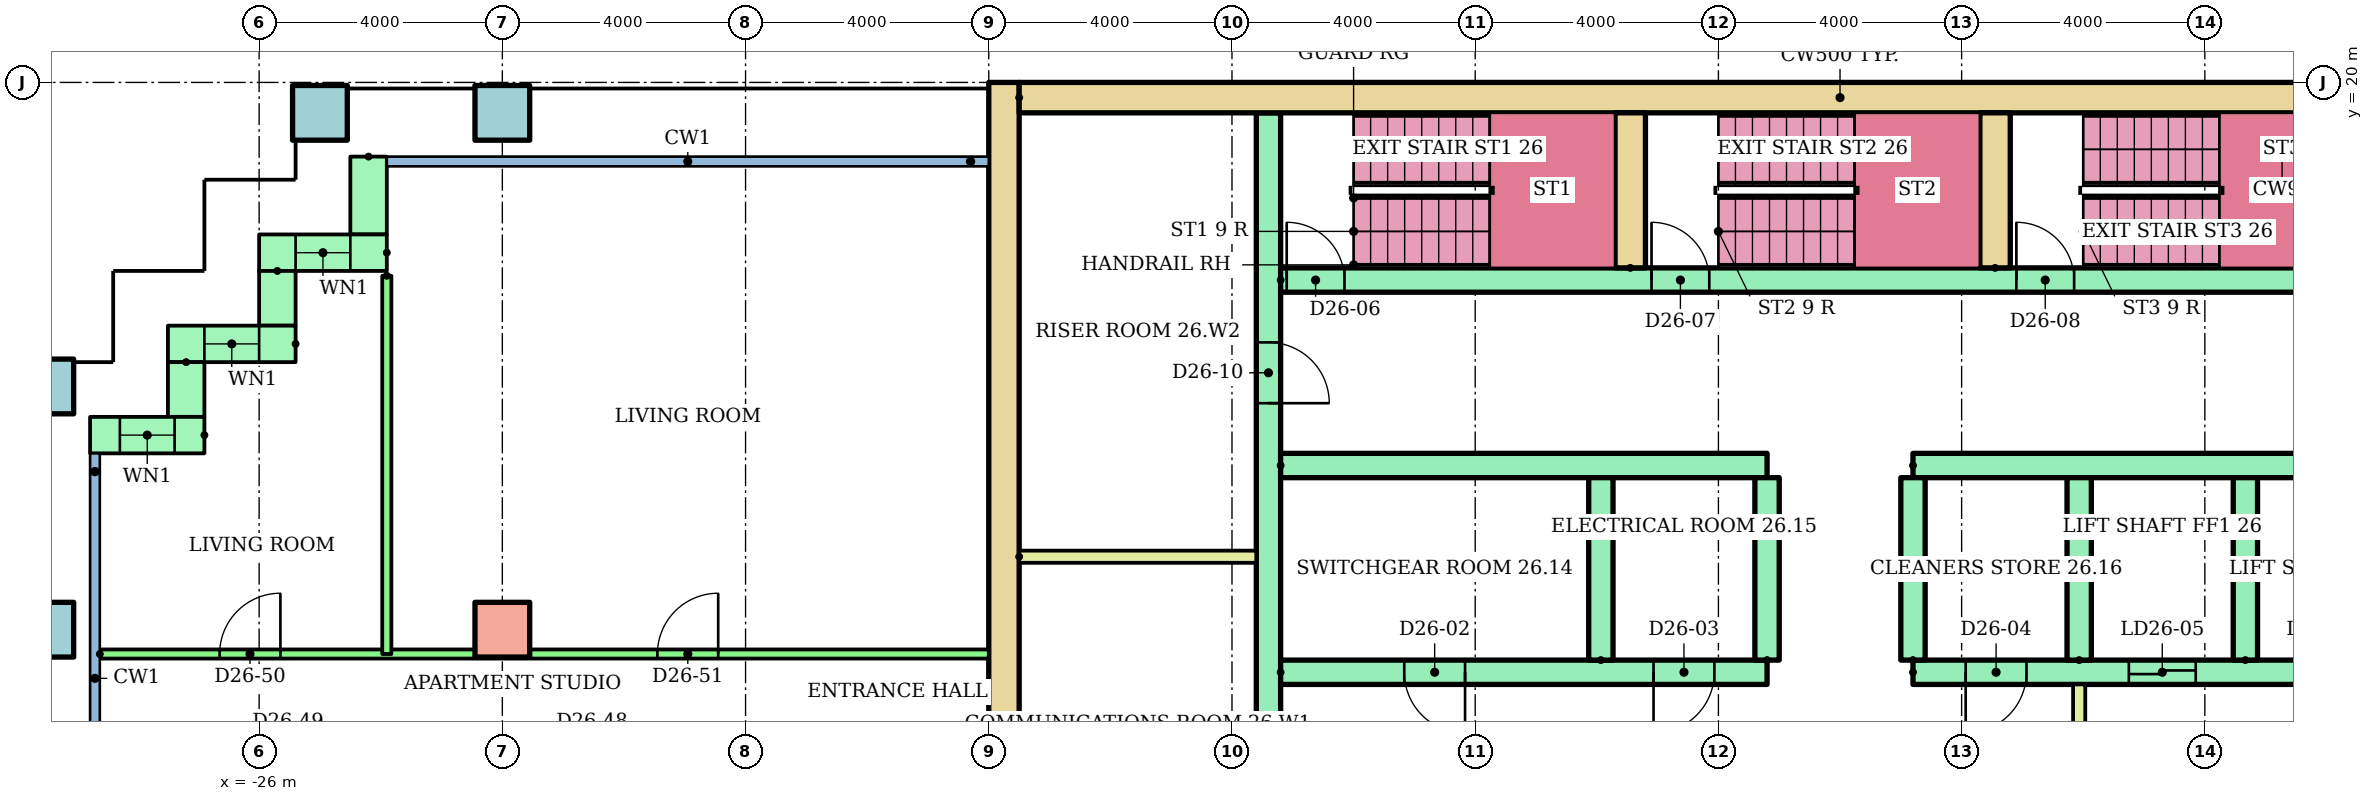
"""IFC4 building model, lengths in metres.
Left out: names, types, materials, properties, quantities, classifications, styles, units other than length and angle.
Written with IfcOpenShell. Run it as: python <this file> out.ifc"""

import sys

from ifc_helpers import new_model, si_unit, direction, frame, frame_2d, origin, origin_2d, place, context, subcontext, project, spatial, rectangle, hollow_rectangle, extrude, element, fill, save


model = new_model("IFC4")
c1 = context("Model", 3, precision=1e-05, world=origin(), true_north=direction((0.0, 1.0)))
c2 = subcontext(c1, "Body", "Model", "MODEL_VIEW")
j1 = project(units=[si_unit("LENGTHUNIT", "METRE"), si_unit("PLANEANGLEUNIT", "RADIAN")], contexts=[c1])
p1 = place(None, origin())
s1 = spatial("IfcSite", under=j1, at=p1, CompositionType="ELEMENT")
p2 = place(p1, origin())
s2 = spatial("IfcBuilding", under=s1, at=p2, CompositionType="ELEMENT")
p3 = place(p2, frame((0.0, 0.0, 99.9)))
s3 = spatial("IfcBuildingStorey", under=s2, at=p3, CompositionType="ELEMENT", Elevation=99.9)
p4 = place(p3, frame((-29.5, 11.0, 0.0)))
e1 = element("IfcColumn", 1, at=p4, inside=s3, PredefinedType="COLUMN", context=c2, shape_type="SweptSolid", body=[
    extrude(hollow_rectangle(XDim=0.9, YDim=0.9, WallThickness=0.045, at=origin_2d()), origin(), (0.0, 0.0, 1.0), 3.2),
])
p5 = place(p3, frame((-22.0, 11.0, 0.0)))
e2 = element("IfcColumn", 2, at=p5, inside=s3, PredefinedType="COLUMN", context=c2, shape_type="SweptSolid", body=[
    extrude(rectangle(XDim=0.9, YDim=0.9, at=origin_2d()), origin(), (0.0, 0.0, 1.0), 3.2),
])
for number, where in (
    (3, (-29.5, 15.0, 0.0)),
    (4, (-25.0, 19.5, 0.0)),
    (5, (-22.0, 19.5, 0.0)),
):
    element("IfcColumn", number, at=place(p3, frame(where)), inside=s3, PredefinedType="COLUMN", context=c2, shape_type="SweptSolid", body=[
        extrude(hollow_rectangle(XDim=0.9, YDim=0.9, WallThickness=0.045, at=origin_2d()), origin(), (0.0, 0.0, 1.0), 3.2),
    ])
p6 = place(p3, frame((-24.2, 18.78, 0.0), z_axis=(0.0, 0.0, 1.0), x_axis=(0.0, -1.0, 0.0)))
e6 = element("IfcWall", 6, at=p6, inside=s3, PredefinedType="STANDARD", context=c2, shape_type="SweptSolid", body=[
    extrude(rectangle(XDim=1.28, YDim=0.6, at=frame_2d((0.64, 0.0))), origin(), (0.0, 0.0, 1.0), 2.92),
])
p7 = place(p3, frame((-23.9, 17.2, 0.0), z_axis=(0.0, 0.0, 1.0), x_axis=(-1.0, 0.0, 0.0)))
e7 = element("IfcWall", 7, at=p7, inside=s3, PredefinedType="STANDARD", context=c2, shape_type="SweptSolid", body=[
    extrude(rectangle(XDim=2.1, YDim=0.6, at=frame_2d((1.05, 0.0))), origin(), (0.0, 0.0, 1.0), 2.92),
])
p8 = place(p7, frame((0.6, 0.0, 0.9)))
e8 = element("IfcOpeningElement", 8, at=p8, cuts=e7, PredefinedType="OPENING", context=c2, shape_type="SweptSolid", body=[
    extrude(rectangle(XDim=0.9, YDim=1.5, at=frame_2d((0.45, 0.75))), frame((0.0, 0.31, 0.0), z_axis=(0.0, -1.0, 0.0), x_axis=(1.0, 0.0, 0.0)), (0.0, 0.0, 1.0), 0.62),
])
p9 = place(p3, frame((-25.7, 16.9, 0.0), z_axis=(0.0, 0.0, 1.0), x_axis=(0.0, -1.0, 0.0)))
e9 = element("IfcWall", 9, at=p9, inside=s3, PredefinedType="STANDARD", context=c2, shape_type="SweptSolid", body=[
    extrude(rectangle(XDim=0.9, YDim=0.6, at=frame_2d((0.45, 0.0))), origin(), (0.0, 0.0, 1.0), 2.92),
])
p10 = place(p3, frame((-25.4, 15.7, 0.0), z_axis=(0.0, 0.0, 1.0), x_axis=(-1.0, 0.0, 0.0)))
e10 = element("IfcWall", 10, at=p10, inside=s3, PredefinedType="STANDARD", context=c2, shape_type="SweptSolid", body=[
    extrude(rectangle(XDim=2.1, YDim=0.6, at=frame_2d((1.05, 0.0))), origin(), (0.0, 0.0, 1.0), 2.92),
])
p11 = place(p10, frame((0.6, 0.0, 0.9)))
e11 = element("IfcOpeningElement", 11, at=p11, cuts=e10, PredefinedType="OPENING", context=c2, shape_type="SweptSolid", body=[
    extrude(rectangle(XDim=0.9, YDim=1.5, at=frame_2d((0.45, 0.75))), frame((0.0, 0.31, 0.0), z_axis=(0.0, -1.0, 0.0), x_axis=(1.0, 0.0, 0.0)), (0.0, 0.0, 1.0), 0.62),
])
p12 = place(p3, frame((-27.2, 15.4, 0.0), z_axis=(0.0, 0.0, 1.0), x_axis=(0.0, -1.0, 0.0)))
e12 = element("IfcWall", 12, at=p12, inside=s3, PredefinedType="STANDARD", context=c2, shape_type="SweptSolid", body=[
    extrude(rectangle(XDim=0.9, YDim=0.6, at=frame_2d((0.45, 0.0))), origin(), (0.0, 0.0, 1.0), 2.92),
])
p13 = place(p3, frame((-26.9, 14.2, 0.0), z_axis=(0.0, 0.0, 1.0), x_axis=(-1.0, 0.0, 0.0)))
e13 = element("IfcWall", 13, at=p13, inside=s3, PredefinedType="STANDARD", context=c2, shape_type="SweptSolid", body=[
    extrude(rectangle(XDim=1.88, YDim=0.6, at=frame_2d((0.94, 0.0))), origin(), (0.0, 0.0, 1.0), 2.92),
])
p14 = place(p13, frame((0.49, 0.0, 0.9)))
e14 = element("IfcOpeningElement", 14, at=p14, cuts=e13, PredefinedType="OPENING", context=c2, shape_type="SweptSolid", body=[
    extrude(rectangle(XDim=0.9, YDim=1.5, at=frame_2d((0.45, 0.75))), frame((0.0, 0.31, 0.0), z_axis=(0.0, -1.0, 0.0), x_axis=(1.0, 0.0, 0.0)), (0.0, 0.0, 1.0), 0.62),
])
p15 = place(p3, frame((-13.75, 3.0, 0.0), z_axis=(0.0, 0.0, 1.0), x_axis=(0.0, 1.0, 0.0)))
e15 = element("IfcWall", 15, at=p15, inside=s3, PredefinedType="SHEAR", context=c2, shape_type="SweptSolid", body=[
    extrude(rectangle(XDim=17.0, YDim=0.5, at=frame_2d((8.5, 0.0))), origin(), (0.0, 0.0, 1.0), 2.92),
])
p16 = place(p3, frame((-13.5, 19.75, 0.0)))
e16 = element("IfcWall", 16, at=p16, inside=s3, PredefinedType="SHEAR", context=c2, shape_type="SweptSolid", body=[
    extrude(rectangle(XDim=27.0, YDim=0.5, at=frame_2d((13.5, 0.0))), origin(), (0.0, 0.0, 1.0), 2.92),
])
p17 = place(p3, frame((-9.4, 6.8, 0.0), z_axis=(0.0, 0.0, 1.0), x_axis=(0.0, 1.0, 0.0)))
e17 = element("IfcWall", 17, at=p17, inside=s3, PredefinedType="SHEAR", context=c2, shape_type="SweptSolid", body=[
    extrude(rectangle(XDim=12.7, YDim=0.4, at=frame_2d((6.35, 0.0))), origin(), (0.0, 0.0, 1.0), 2.92),
])
p18 = place(p17, frame((1.15, 0.0, 0.0)))
e18 = element("IfcOpeningElement", 18, at=p18, cuts=e17, PredefinedType="OPENING", context=c2, shape_type="SweptSolid", body=[
    extrude(rectangle(XDim=1.0, YDim=2.1, at=frame_2d((0.5, 1.05))), frame((0.0, 0.21, 0.0), z_axis=(0.0, -1.0, 0.0), x_axis=(1.0, 0.0, 0.0)), (0.0, 0.0, 1.0), 0.42),
])
p19 = place(p17, frame((7.925, 0.0, 0.0)))
e19 = element("IfcOpeningElement", 19, at=p19, cuts=e17, PredefinedType="OPENING", context=c2, shape_type="SweptSolid", body=[
    extrude(rectangle(XDim=1.0, YDim=2.1, at=frame_2d((0.5, 1.05))), frame((0.0, 0.21, 0.0), z_axis=(0.0, -1.0, 0.0), x_axis=(1.0, 0.0, 0.0)), (0.0, 0.0, 1.0), 0.42),
])
p20 = place(p3, frame((-9.2, 10.3, 0.0)))
e20 = element("IfcWall", 20, at=p20, inside=s3, PredefinedType="SHEAR", context=c2, shape_type="SweptSolid", body=[
    extrude(rectangle(XDim=8.0, YDim=0.4, at=frame_2d((4.0, 0.0))), origin(), (0.0, 0.0, 1.0), 2.92),
])
p21 = place(p20, frame((2.033, 0.0, 0.0)))
e21 = element("IfcOpeningElement", 21, at=p21, cuts=e20, PredefinedType="OPENING", context=c2, shape_type="SweptSolid", body=[
    extrude(rectangle(XDim=1.0, YDim=2.1, at=frame_2d((0.5, 1.05))), frame((0.0, 0.21, 0.0), z_axis=(0.0, -1.0, 0.0), x_axis=(1.0, 0.0, 0.0)), (0.0, 0.0, 1.0), 0.42),
])
p22 = place(p20, frame((6.133, 0.0, 0.0)))
e22 = element("IfcOpeningElement", 22, at=p22, cuts=e20, PredefinedType="OPENING", context=c2, shape_type="SweptSolid", body=[
    extrude(rectangle(XDim=1.0, YDim=2.1, at=frame_2d((0.5, 1.05))), frame((0.0, 0.21, 0.0), z_axis=(0.0, -1.0, 0.0), x_axis=(1.0, 0.0, 0.0)), (0.0, 0.0, 1.0), 0.42),
])
p23 = place(p3, frame((-9.2, 13.7, 0.0)))
e23 = element("IfcWall", 23, at=p23, inside=s3, PredefinedType="SHEAR", context=c2, shape_type="SweptSolid", body=[
    extrude(rectangle(XDim=8.0, YDim=0.4, at=frame_2d((4.0, 0.0))), origin(), (0.0, 0.0, 1.0), 2.92),
])
p24 = place(p3, frame((1.2, 10.3, 0.0)))
e24 = element("IfcWall", 24, at=p24, inside=s3, PredefinedType="SHEAR", context=c2, shape_type="SweptSolid", body=[
    extrude(rectangle(XDim=8.0, YDim=0.4, at=frame_2d((4.0, 0.0))), origin(), (0.0, 0.0, 1.0), 2.92),
])
p25 = place(p24, frame((3.55, 0.0, 0.0)))
e25 = element("IfcOpeningElement", 25, at=p25, cuts=e24, PredefinedType="OPENING", context=c2, shape_type="SweptSolid", body=[
    extrude(rectangle(XDim=1.1, YDim=2.1, at=frame_2d((0.55, 1.05))), frame((0.0, 0.21, 0.0), z_axis=(0.0, -1.0, 0.0), x_axis=(1.0, 0.0, 0.0)), (0.0, 0.0, 1.0), 0.42),
])
p26 = place(p24, frame((6.283, 0.0, 0.0)))
e26 = element("IfcOpeningElement", 26, at=p26, cuts=e24, PredefinedType="OPENING", context=c2, shape_type="SweptSolid", body=[
    extrude(rectangle(XDim=1.1, YDim=2.1, at=frame_2d((0.55, 1.05))), frame((0.0, 0.21, 0.0), z_axis=(0.0, -1.0, 0.0), x_axis=(1.0, 0.0, 0.0)), (0.0, 0.0, 1.0), 0.42),
])
p27 = place(p24, frame((0.867, 0.0, 0.0)))
e27 = element("IfcOpeningElement", 27, at=p27, cuts=e24, PredefinedType="OPENING", context=c2, shape_type="SweptSolid", body=[
    extrude(rectangle(XDim=1.0, YDim=2.1, at=frame_2d((0.5, 1.05))), frame((0.0, 0.21, 0.0), z_axis=(0.0, -1.0, 0.0), x_axis=(1.0, 0.0, 0.0)), (0.0, 0.0, 1.0), 0.42),
])
p28 = place(p3, frame((1.2, 13.7, 0.0)))
e28 = element("IfcWall", 28, at=p28, inside=s3, PredefinedType="SHEAR", context=c2, shape_type="SweptSolid", body=[
    extrude(rectangle(XDim=8.0, YDim=0.4, at=frame_2d((4.0, 0.0))), origin(), (0.0, 0.0, 1.0), 2.92),
])
for number, where, z_axis, x_axis in (
    (29, (-3.933, 10.5, 0.0), (0.0, 0.0, 1.0), (0.0, 1.0, 0.0)),
    (30, (-1.2, 10.5, 0.0), (0.0, 0.0, 1.0), (0.0, 1.0, 0.0)),
    (31, (1.2, 10.5, 0.0), (0.0, 0.0, 1.0), (0.0, 1.0, 0.0)),
    (32, (3.933, 10.5, 0.0), (0.0, 0.0, 1.0), (0.0, 1.0, 0.0)),
    (33, (6.667, 10.5, 0.0), (0.0, 0.0, 1.0), (0.0, 1.0, 0.0)),
):
    element("IfcWall", number, at=place(p3, frame(where, z_axis=z_axis, x_axis=x_axis)), inside=s3, PredefinedType="SHEAR", context=c2, shape_type="SweptSolid", body=[
        extrude(rectangle(XDim=3.0, YDim=0.4, at=frame_2d((1.5, 0.0))), origin(), (0.0, 0.0, 1.0), 2.92),
    ])
p29 = place(p3, frame((3.933, 6.8, 0.0), z_axis=(0.0, 0.0, 1.0), x_axis=(0.0, 1.0, 0.0)))
e34 = element("IfcWall", 34, at=p29, inside=s3, PredefinedType="PARTITIONING", context=c2, shape_type="SweptSolid", body=[
    extrude(rectangle(XDim=3.3, YDim=0.2, at=frame_2d((1.65, 0.0))), origin(), (0.0, 0.0, 1.0), 2.92),
])
p30 = place(p29, frame((1.1, 0.0, 0.0)))
e35 = element("IfcOpeningElement", 35, at=p30, cuts=e34, PredefinedType="OPENING", context=c2, shape_type="SweptSolid", body=[
    extrude(rectangle(XDim=1.1, YDim=2.1, at=frame_2d((0.55, 1.05))), frame((0.0, 0.11, 0.0), z_axis=(0.0, -1.0, 0.0), x_axis=(1.0, 0.0, 0.0)), (0.0, 0.0, 1.0), 0.22),
])
p31 = place(p3, frame((-9.2, 16.75, 0.0)))
e36 = element("IfcWall", 36, at=p31, inside=s3, PredefinedType="SHEAR", context=c2, shape_type="SweptSolid", body=[
    extrude(rectangle(XDim=18.4, YDim=0.4, at=frame_2d((9.2, 0.0))), origin(), (0.0, 0.0, 1.0), 2.92),
])
p32 = place(p31, frame((0.1, 0.0, 0.0)))
e37 = element("IfcOpeningElement", 37, at=p32, cuts=e36, PredefinedType="OPENING", context=c2, shape_type="SweptSolid", body=[
    extrude(rectangle(XDim=0.95, YDim=2.1, at=frame_2d((0.475, 1.05))), frame((0.0, 0.21, 0.0), z_axis=(0.0, -1.0, 0.0), x_axis=(1.0, 0.0, 0.0)), (0.0, 0.0, 1.0), 0.42),
])
p33 = place(p31, frame((6.1, 0.0, 0.0)))
e38 = element("IfcOpeningElement", 38, at=p33, cuts=e36, PredefinedType="OPENING", context=c2, shape_type="SweptSolid", body=[
    extrude(rectangle(XDim=0.95, YDim=2.1, at=frame_2d((0.475, 1.05))), frame((0.0, 0.21, 0.0), z_axis=(0.0, -1.0, 0.0), x_axis=(1.0, 0.0, 0.0)), (0.0, 0.0, 1.0), 0.42),
])
p34 = place(p31, frame((12.1, 0.0, 0.0)))
e39 = element("IfcOpeningElement", 39, at=p34, cuts=e36, PredefinedType="OPENING", context=c2, shape_type="SweptSolid", body=[
    extrude(rectangle(XDim=0.95, YDim=2.1, at=frame_2d((0.475, 1.05))), frame((0.0, 0.21, 0.0), z_axis=(0.0, -1.0, 0.0), x_axis=(1.0, 0.0, 0.0)), (0.0, 0.0, 1.0), 0.42),
])
for number, where, z_axis, x_axis in (
    (40, (-3.45, 16.95, 0.0), (0.0, 0.0, 1.0), (0.0, 1.0, 0.0)),
    (41, (2.55, 16.95, 0.0), (0.0, 0.0, 1.0), (0.0, 1.0, 0.0)),
):
    element("IfcWall", number, at=place(p3, frame(where, z_axis=z_axis, x_axis=x_axis)), inside=s3, PredefinedType="SHEAR", context=c2, shape_type="SweptSolid", body=[
        extrude(rectangle(XDim=2.55, YDim=0.5, at=frame_2d((1.275, 0.0))), origin(), (0.0, 0.0, 1.0), 2.92),
    ])
p35 = place(p3, frame((-13.5, 12.2, 0.0)))
e42 = element("IfcWall", 42, at=p35, inside=s3, PredefinedType="PARTITIONING", context=c2, shape_type="SweptSolid", body=[
    extrude(rectangle(XDim=3.9, YDim=0.2, at=frame_2d((1.95, 0.0))), origin(), (0.0, 0.0, 1.0), 2.92),
])
p36 = place(p3, frame((-28.62, 10.6, 0.0)))
e43 = element("IfcWall", 43, at=p36, inside=s3, PredefinedType="PARTITIONING", context=c2, shape_type="SweptSolid", body=[
    extrude(rectangle(XDim=14.62, YDim=0.15, at=frame_2d((7.31, 0.0))), origin(), (0.0, 0.0, 1.0), 2.4),
])
p37 = place(p36, frame((1.97, 0.0, 0.0)))
e44 = element("IfcOpeningElement", 44, at=p37, cuts=e43, PredefinedType="OPENING", context=c2, shape_type="SweptSolid", body=[
    extrude(rectangle(XDim=1.0, YDim=2.1, at=frame_2d((0.5, 1.05))), frame((0.0, 0.085, 0.0), z_axis=(0.0, -1.0, 0.0), x_axis=(1.0, 0.0, 0.0)), (0.0, 0.0, 1.0), 0.17),
])
p38 = place(p36, frame((9.17, 0.0, 0.0)))
e45 = element("IfcOpeningElement", 45, at=p38, cuts=e43, PredefinedType="OPENING", context=c2, shape_type="SweptSolid", body=[
    extrude(rectangle(XDim=1.0, YDim=2.1, at=frame_2d((0.5, 1.05))), frame((0.0, 0.085, 0.0), z_axis=(0.0, -1.0, 0.0), x_axis=(1.0, 0.0, 0.0)), (0.0, 0.0, 1.0), 0.17),
])
p39 = place(p3, frame((-23.9, 16.82, 0.0), z_axis=(0.0, 0.0, 1.0), x_axis=(0.0, -1.0, 0.0)))
e46 = element("IfcWall", 46, at=p39, inside=s3, PredefinedType="PARTITIONING", context=c2, shape_type="SweptSolid", body=[
    extrude(rectangle(XDim=6.22, YDim=0.15, at=frame_2d((3.11, 0.0))), origin(), (0.0, 0.0, 1.0), 2.4),
])
p40 = place(p8, origin())
e47 = element("IfcWindow", 47, at=p40, inside=s3, PartitioningType="SINGLE_PANEL", PredefinedType="WINDOW", context=c2, shape_type="SweptSolid", body=[
    extrude(rectangle(XDim=0.9, YDim=1.5, at=frame_2d((0.45, 0.75))), frame((0.0, 0.03, 0.0), z_axis=(0.0, -1.0, 0.0), x_axis=(1.0, 0.0, 0.0)), (0.0, 0.0, 1.0), 0.06),
])
fill(e8, e47)
p41 = place(p11, origin())
e48 = element("IfcWindow", 48, at=p41, inside=s3, PartitioningType="SINGLE_PANEL", PredefinedType="WINDOW", context=c2, shape_type="SweptSolid", body=[
    extrude(rectangle(XDim=0.9, YDim=1.5, at=frame_2d((0.45, 0.75))), frame((0.0, 0.03, 0.0), z_axis=(0.0, -1.0, 0.0), x_axis=(1.0, 0.0, 0.0)), (0.0, 0.0, 1.0), 0.06),
])
fill(e11, e48)
p42 = place(p14, origin())
e49 = element("IfcWindow", 49, at=p42, inside=s3, PartitioningType="SINGLE_PANEL", PredefinedType="WINDOW", context=c2, shape_type="SweptSolid", body=[
    extrude(rectangle(XDim=0.9, YDim=1.5, at=frame_2d((0.45, 0.75))), frame((0.0, 0.03, 0.0), z_axis=(0.0, -1.0, 0.0), x_axis=(1.0, 0.0, 0.0)), (0.0, 0.0, 1.0), 0.06),
])
fill(e14, e49)
p43 = place(p25, origin())
e50 = element("IfcDoor", 50, at=p43, inside=s3, OperationType="SLIDING_TO_LEFT", PredefinedType="DOOR", context=c2, shape_type="SweptSolid", body=[
    extrude(rectangle(XDim=1.1, YDim=2.1, at=frame_2d((0.55, 1.05))), frame((0.0, 0.025, 0.0), z_axis=(0.0, -1.0, 0.0), x_axis=(1.0, 0.0, 0.0)), (0.0, 0.0, 1.0), 0.05),
])
fill(e25, e50)
p44 = place(p21, frame((1.0, 0.0, 0.0), z_axis=(0.0, 0.0, 1.0), x_axis=(-1.0, 0.0, 0.0)))
e51 = element("IfcDoor", 51, at=p44, inside=s3, OperationType="SINGLE_SWING_RIGHT", PredefinedType="DOOR", context=c2, shape_type="SweptSolid", body=[
    extrude(rectangle(XDim=1.0, YDim=2.1, at=frame_2d((0.5, 1.05))), frame((0.0, 0.025, 0.0), z_axis=(0.0, -1.0, 0.0), x_axis=(1.0, 0.0, 0.0)), (0.0, 0.0, 1.0), 0.05),
])
fill(e21, e51)
p45 = place(p22, frame((1.0, 0.0, 0.0), z_axis=(0.0, 0.0, 1.0), x_axis=(-1.0, 0.0, 0.0)))
e52 = element("IfcDoor", 52, at=p45, inside=s3, OperationType="SINGLE_SWING_LEFT", PredefinedType="DOOR", context=c2, shape_type="SweptSolid", body=[
    extrude(rectangle(XDim=1.0, YDim=2.1, at=frame_2d((0.5, 1.05))), frame((0.0, 0.025, 0.0), z_axis=(0.0, -1.0, 0.0), x_axis=(1.0, 0.0, 0.0)), (0.0, 0.0, 1.0), 0.05),
])
fill(e22, e52)
p46 = place(p27, frame((1.0, 0.0, 0.0), z_axis=(0.0, 0.0, 1.0), x_axis=(-1.0, 0.0, 0.0)))
e53 = element("IfcDoor", 53, at=p46, inside=s3, OperationType="SINGLE_SWING_LEFT", PredefinedType="DOOR", context=c2, shape_type="SweptSolid", body=[
    extrude(rectangle(XDim=1.0, YDim=2.1, at=frame_2d((0.5, 1.05))), frame((0.0, 0.025, 0.0), z_axis=(0.0, -1.0, 0.0), x_axis=(1.0, 0.0, 0.0)), (0.0, 0.0, 1.0), 0.05),
])
fill(e27, e53)
p47 = place(p32, origin())
e54 = element("IfcDoor", 54, at=p47, inside=s3, OperationType="SINGLE_SWING_LEFT", PredefinedType="DOOR", context=c2, shape_type="SweptSolid", body=[
    extrude(rectangle(XDim=0.95, YDim=2.1, at=frame_2d((0.475, 1.05))), frame((0.0, 0.025, 0.0), z_axis=(0.0, -1.0, 0.0), x_axis=(1.0, 0.0, 0.0)), (0.0, 0.0, 1.0), 0.05),
])
fill(e37, e54)
p48 = place(p33, origin())
e55 = element("IfcDoor", 55, at=p48, inside=s3, OperationType="SINGLE_SWING_LEFT", PredefinedType="DOOR", context=c2, shape_type="SweptSolid", body=[
    extrude(rectangle(XDim=0.95, YDim=2.1, at=frame_2d((0.475, 1.05))), frame((0.0, 0.025, 0.0), z_axis=(0.0, -1.0, 0.0), x_axis=(1.0, 0.0, 0.0)), (0.0, 0.0, 1.0), 0.05),
])
fill(e38, e55)
p49 = place(p34, origin())
e56 = element("IfcDoor", 56, at=p49, inside=s3, OperationType="SINGLE_SWING_LEFT", PredefinedType="DOOR", context=c2, shape_type="SweptSolid", body=[
    extrude(rectangle(XDim=0.95, YDim=2.1, at=frame_2d((0.475, 1.05))), frame((0.0, 0.025, 0.0), z_axis=(0.0, -1.0, 0.0), x_axis=(1.0, 0.0, 0.0)), (0.0, 0.0, 1.0), 0.05),
])
fill(e39, e56)
p50 = place(p19, frame((1.0, 0.0, 0.0), z_axis=(0.0, 0.0, 1.0), x_axis=(-1.0, 0.0, 0.0)))
e57 = element("IfcDoor", 57, at=p50, inside=s3, OperationType="SINGLE_SWING_LEFT", PredefinedType="DOOR", context=c2, shape_type="SweptSolid", body=[
    extrude(rectangle(XDim=1.0, YDim=2.1, at=frame_2d((0.5, 1.05))), frame((0.0, 0.025, 0.0), z_axis=(0.0, -1.0, 0.0), x_axis=(1.0, 0.0, 0.0)), (0.0, 0.0, 1.0), 0.05),
])
fill(e19, e57)
p51 = place(p37, origin())
e58 = element("IfcDoor", 58, at=p51, inside=s3, OperationType="SINGLE_SWING_RIGHT", PredefinedType="DOOR", context=c2, shape_type="SweptSolid", body=[
    extrude(rectangle(XDim=1.0, YDim=2.1, at=frame_2d((0.5, 1.05))), frame((0.0, 0.025, 0.0), z_axis=(0.0, -1.0, 0.0), x_axis=(1.0, 0.0, 0.0)), (0.0, 0.0, 1.0), 0.05),
])
fill(e44, e58)
p52 = place(p38, origin())
e59 = element("IfcDoor", 59, at=p52, inside=s3, OperationType="SINGLE_SWING_RIGHT", PredefinedType="DOOR", context=c2, shape_type="SweptSolid", body=[
    extrude(rectangle(XDim=1.0, YDim=2.1, at=frame_2d((0.5, 1.05))), frame((0.0, 0.025, 0.0), z_axis=(0.0, -1.0, 0.0), x_axis=(1.0, 0.0, 0.0)), (0.0, 0.0, 1.0), 0.05),
])
fill(e45, e59)
save(model, sys.argv[1])
